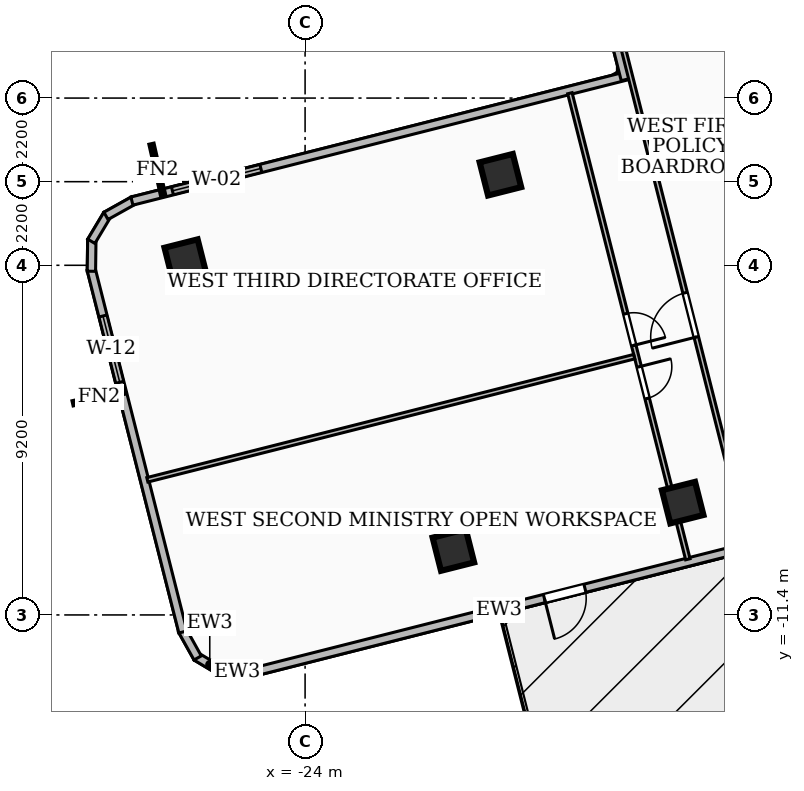
"""IFC4 building model, lengths in metres.
Left out: names, types, materials, properties, quantities, classifications, styles, units other than length and angle.
Written with IfcOpenShell. Run it as: python <this file> out.ifc"""

import sys

from ifc_helpers import new_model, si_unit, direction, frame, frame_2d, origin, origin_2d, place, context, subcontext, project, spatial, rectangle, extrude, element, fill, save


model = new_model("IFC4")
c1 = context("Model", 3, precision=1e-05, world=origin(), true_north=direction((0.0, 1.0)))
c2 = subcontext(c1, "Body", "Model", "MODEL_VIEW")
j1 = project(units=[si_unit("LENGTHUNIT", "METRE"), si_unit("PLANEANGLEUNIT", "RADIAN")], contexts=[c1])
p1 = place(None, origin())
s1 = spatial("IfcSite", under=j1, at=p1, CompositionType="ELEMENT")
p2 = place(p1, origin())
s2 = spatial("IfcBuilding", under=s1, at=p2, CompositionType="ELEMENT")
p3 = place(p2, frame((0.0, 0.0, 130.68)))
s3 = spatial("IfcBuildingStorey", under=s2, at=p3, CompositionType="ELEMENT", Elevation=130.68)
for number, where, z_axis, x_axis in (
    (1, (-18.86, 0.183, 0.0), (0.0, 0.0, 1.0), (0.969, 0.245, 0.0)),
    (2, (-14.064, -8.445, 0.0), (0.0, 0.0, 1.0), (0.969, 0.245, 0.0)),
    (3, (-27.153, -2.064, 0.0), (0.0, 0.0, 1.0), (0.969, 0.245, 0.0)),
    (4, (-20.098, -9.692, 0.0), (0.0, 0.0, 1.0), (0.969, 0.245, 0.0)),
):
    element("IfcColumn", number, at=place(p3, frame(where, z_axis=z_axis, x_axis=x_axis)), inside=s3, PredefinedType="COLUMN", context=c2, shape_type="SweptSolid", body=[
        extrude(rectangle(XDim=0.9, YDim=0.9, at=origin_2d()), origin(), (0.0, 0.0, 1.0), 3.6),
    ])
p4 = place(p3, frame((-12.371, -9.618, 0.0), z_axis=(0.0, 0.0, 1.0), x_axis=(-0.969434127448, -0.245351732293, 0.0)))
e5 = element("IfcWall", 5, at=p4, inside=s3, PredefinedType="SOLIDWALL", context=c2, shape_type="SweptSolid", body=[
    extrude(rectangle(XDim=13.458, YDim=0.22, at=frame_2d((6.729, 0.0))), origin(), (0.0, 0.0, 1.0), 3.32),
])
p5 = place(p4, frame((4.4, 0.0, 0.0)))
e6 = element("IfcOpeningElement", 6, at=p5, cuts=e5, PredefinedType="OPENING", context=c2, shape_type="SweptSolid", body=[
    extrude(rectangle(XDim=1.1, YDim=2.1, at=frame_2d((0.55, 1.05))), frame((0.0, 0.12, 0.0), z_axis=(0.0, -1.0, 0.0), x_axis=(1.0, 0.0, 0.0)), (0.0, 0.0, 1.0), 0.24),
])
p6 = place(p3, frame((-25.369, -12.914, 0.0), z_axis=(0.0, 0.0, 1.0), x_axis=(-0.999913243347, 0.013172159236, 0.0)))
e7 = element("IfcWall", 7, at=p6, inside=s3, PredefinedType="SOLIDWALL", context=c2, shape_type="SweptSolid", body=[
    extrude(rectangle(XDim=0.834, YDim=0.22, at=frame_2d((0.417, 0.0))), origin(), (0.0, 0.0, 1.0), 3.32),
])
p7 = place(p3, frame((-26.157, -12.916, 0.0), z_axis=(0.0, 0.0, 1.0), x_axis=(-0.858543269067, 0.512741119026, 0.0)))
e8 = element("IfcWall", 8, at=p7, inside=s3, PredefinedType="SOLIDWALL", context=c2, shape_type="SweptSolid", body=[
    extrude(rectangle(XDim=0.819, YDim=0.22, at=frame_2d((0.41, 0.0))), origin(), (0.0, 0.0, 1.0), 3.32),
])
p8 = place(p3, frame((-26.827, -12.531, 0.0), z_axis=(0.0, 0.0, 1.0), x_axis=(-0.486561807946, 0.873646156661, 0.0)))
e9 = element("IfcWall", 9, at=p8, inside=s3, PredefinedType="SOLIDWALL", context=c2, shape_type="SweptSolid", body=[
    extrude(rectangle(XDim=0.834, YDim=0.22, at=frame_2d((0.417, 0.0))), origin(), (0.0, 0.0, 1.0), 3.32),
])
p9 = place(p3, frame((-27.215, -11.848, 0.0), z_axis=(0.0, 0.0, 1.0), x_axis=(-0.245295842673, 0.969448270702, 0.0)))
e10 = element("IfcWall", 10, at=p9, inside=s3, PredefinedType="SOLIDWALL", context=c2, shape_type="SweptSolid", body=[
    extrude(rectangle(XDim=9.84, YDim=0.22, at=frame_2d((4.92, 0.0))), origin(), (0.0, 0.0, 1.0), 3.32),
])
p10 = place(p9, frame((6.776, 0.0, 0.85)))
e11 = element("IfcOpeningElement", 11, at=p10, cuts=e10, PredefinedType="OPENING", context=c2, shape_type="SweptSolid", body=[
    extrude(rectangle(XDim=1.8, YDim=1.6, at=frame_2d((0.9, 0.8))), frame((0.0, 0.12, 0.0), z_axis=(0.0, -1.0, 0.0), x_axis=(1.0, 0.0, 0.0)), (0.0, 0.0, 1.0), 0.24),
])
p11 = place(p3, frame((-29.623, -2.357, 0.0), z_axis=(0.0, 0.0, 1.0), x_axis=(0.013172159236, 0.999913243347, 0.0)))
e12 = element("IfcWall", 12, at=p11, inside=s3, PredefinedType="SOLIDWALL", context=c2, shape_type="SweptSolid", body=[
    extrude(rectangle(XDim=0.834, YDim=0.22, at=frame_2d((0.417, 0.0))), origin(), (0.0, 0.0, 1.0), 3.32),
])
p12 = place(p3, frame((-29.625, -1.569, 0.0), z_axis=(0.0, 0.0, 1.0), x_axis=(0.513266477087, 0.858229295409, 0.0)))
e13 = element("IfcWall", 13, at=p12, inside=s3, PredefinedType="SOLIDWALL", context=c2, shape_type="SweptSolid", body=[
    extrude(rectangle(XDim=0.818, YDim=0.22, at=frame_2d((0.409, 0.0))), origin(), (0.0, 0.0, 1.0), 3.32),
])
p13 = place(p3, frame((-29.24, -0.9, 0.0), z_axis=(0.0, 0.0, 1.0), x_axis=(0.873148499647, 0.487454303052, 0.0)))
e14 = element("IfcWall", 14, at=p13, inside=s3, PredefinedType="SOLIDWALL", context=c2, shape_type="SweptSolid", body=[
    extrude(rectangle(XDim=0.835, YDim=0.22, at=frame_2d((0.417, 0.0))), origin(), (0.0, 0.0, 1.0), 3.32),
])
p14 = place(p3, frame((-28.557, -0.511, 0.0), z_axis=(0.0, 0.0, 1.0), x_axis=(0.969429758912, 0.245368992613, 0.0)))
e15 = element("IfcWall", 15, at=p14, inside=s3, PredefinedType="SOLIDWALL", context=c2, shape_type="SweptSolid", body=[
    extrude(rectangle(XDim=13.457, YDim=0.22, at=frame_2d((6.729, 0.0))), origin(), (0.0, 0.0, 1.0), 3.32),
])
p15 = place(p14, frame((1.1, 0.0, 0.85)))
e16 = element("IfcOpeningElement", 16, at=p15, cuts=e15, PredefinedType="OPENING", context=c2, shape_type="SweptSolid", body=[
    extrude(rectangle(XDim=2.4, YDim=2.1, at=frame_2d((1.2, 1.05))), frame((0.0, 0.12, 0.0), z_axis=(0.0, -1.0, 0.0), x_axis=(1.0, 0.0, 0.0)), (0.0, 0.0, 1.0), 0.24),
])
p16 = place(p3, frame((-15.574, 2.684, 0.0), z_axis=(0.0, 0.0, 1.0), x_axis=(-0.245346347134, 0.969435490349, 0.0)))
e17 = element("IfcWall", 17, at=p16, inside=s3, PredefinedType="SOLIDWALL", context=c2, shape_type="SweptSolid", body=[
    extrude(rectangle(XDim=6.538, YDim=0.22, at=frame_2d((3.269, 0.0))), origin(), (0.0, 0.0, 1.0), 3.32),
])
p17 = place(p3, frame((-11.342, -13.433, 0.0), z_axis=(0.0, 0.0, 1.0), x_axis=(-0.24525085526, 0.969459652587, 0.0)))
e18 = element("IfcWall", 18, at=p17, inside=s3, PredefinedType="PARTITIONING", context=c2, shape_type="SweptSolid", body=[
    extrude(rectangle(XDim=20.261, YDim=0.12, at=frame_2d((10.13, 0.0))), origin(), (0.0, 0.0, 1.0), 2.55),
])
p18 = place(p17, frame((9.64, 0.0, 0.0)))
e19 = element("IfcOpeningElement", 19, at=p18, cuts=e18, PredefinedType="OPENING", context=c2, shape_type="SweptSolid", body=[
    extrude(rectangle(XDim=1.2, YDim=2.1, at=frame_2d((0.6, 1.05))), frame((0.0, 0.07, 0.0), z_axis=(0.0, -1.0, 0.0), x_axis=(1.0, 0.0, 0.0)), (0.0, 0.0, 1.0), 0.14),
])
p19 = place(p3, frame((-15.339, -4.604, 0.0), z_axis=(0.0, 0.0, 1.0), x_axis=(-0.969461701565, -0.245242755651, 0.0)))
e20 = element("IfcWall", 20, at=p19, inside=s3, PredefinedType="PARTITIONING", context=c2, shape_type="SweptSolid", body=[
    extrude(rectangle(XDim=13.215, YDim=0.12, at=frame_2d((6.608, 0.0))), origin(), (0.0, 0.0, 1.0), 2.7),
])
p20 = place(p3, frame((-17.032, 2.328, 0.0), z_axis=(0.0, 0.0, 1.0), x_axis=(0.245381918011, -0.969426487318, 0.0)))
e21 = element("IfcWall", 21, at=p20, inside=s3, PredefinedType="PARTITIONING", context=c2, shape_type="SweptSolid", body=[
    extrude(rectangle(XDim=12.65, YDim=0.12, at=frame_2d((6.325, 0.0))), origin(), (0.0, 0.0, 1.0), 2.55),
])
p21 = place(p20, frame((5.985, 0.0, 0.0)))
e22 = element("IfcOpeningElement", 22, at=p21, cuts=e21, PredefinedType="OPENING", context=c2, shape_type="SweptSolid", body=[
    extrude(rectangle(XDim=0.86, YDim=2.04, at=frame_2d((0.43, 1.02))), frame((0.0, 0.07, 0.0), z_axis=(0.0, -1.0, 0.0), x_axis=(1.0, 0.0, 0.0)), (0.0, 0.0, 1.0), 0.14),
])
p22 = place(p20, frame((7.425, 0.0, 0.0)))
e23 = element("IfcOpeningElement", 23, at=p22, cuts=e21, PredefinedType="OPENING", context=c2, shape_type="SweptSolid", body=[
    extrude(rectangle(XDim=0.86, YDim=2.04, at=frame_2d((0.43, 1.02))), frame((0.0, 0.07, 0.0), z_axis=(0.0, -1.0, 0.0), x_axis=(1.0, 0.0, 0.0)), (0.0, 0.0, 1.0), 0.14),
])
p23 = place(p5, origin())
e24 = element("IfcDoor", 24, at=p23, inside=s3, OperationType="SINGLE_SWING_RIGHT", PredefinedType="DOOR", context=c2, shape_type="SweptSolid", body=[
    extrude(rectangle(XDim=1.1, YDim=2.1, at=frame_2d((0.55, 1.05))), frame((0.0, 0.025, 0.0), z_axis=(0.0, -1.0, 0.0), x_axis=(1.0, 0.0, 0.0)), (0.0, 0.0, 1.0), 0.05),
])
fill(e6, e24)
p24 = place(p10, origin())
e25 = element("IfcWindow", 25, at=p24, inside=s3, PartitioningType="SINGLE_PANEL", PredefinedType="WINDOW", context=c2, shape_type="SweptSolid", body=[
    extrude(rectangle(XDim=1.8, YDim=1.6, at=frame_2d((0.9, 0.8))), frame((0.0, 0.03, 0.0), z_axis=(0.0, -1.0, 0.0), x_axis=(1.0, 0.0, 0.0)), (0.0, 0.0, 1.0), 0.06),
])
fill(e11, e25)
p25 = place(p15, origin())
e26 = element("IfcWindow", 26, at=p25, inside=s3, PartitioningType="SINGLE_PANEL", PredefinedType="WINDOW", context=c2, shape_type="SweptSolid", body=[
    extrude(rectangle(XDim=2.4, YDim=2.1, at=frame_2d((1.2, 1.05))), frame((0.0, 0.03, 0.0), z_axis=(0.0, -1.0, 0.0), x_axis=(1.0, 0.0, 0.0)), (0.0, 0.0, 1.0), 0.06),
])
fill(e16, e26)
p26 = place(p18, origin())
e27 = element("IfcDoor", 27, at=p26, inside=s3, OperationType="SINGLE_SWING_LEFT", PredefinedType="DOOR", context=c2, shape_type="SweptSolid", body=[
    extrude(rectangle(XDim=1.2, YDim=2.1, at=frame_2d((0.6, 1.05))), frame((0.0, 0.025, 0.0), z_axis=(0.0, -1.0, 0.0), x_axis=(1.0, 0.0, 0.0)), (0.0, 0.0, 1.0), 0.05),
])
fill(e19, e27)
p27 = place(p21, origin())
e28 = element("IfcDoor", 28, at=p27, inside=s3, OperationType="SINGLE_SWING_RIGHT", PredefinedType="DOOR", context=c2, shape_type="SweptSolid", body=[
    extrude(rectangle(XDim=0.86, YDim=2.04, at=frame_2d((0.43, 1.02))), frame((0.0, 0.025, 0.0), z_axis=(0.0, -1.0, 0.0), x_axis=(1.0, 0.0, 0.0)), (0.0, 0.0, 1.0), 0.05),
])
fill(e22, e28)
p28 = place(p22, origin())
e29 = element("IfcDoor", 29, at=p28, inside=s3, OperationType="SINGLE_SWING_LEFT", PredefinedType="DOOR", context=c2, shape_type="SweptSolid", body=[
    extrude(rectangle(XDim=0.86, YDim=2.04, at=frame_2d((0.43, 1.02))), frame((0.0, 0.025, 0.0), z_axis=(0.0, -1.0, 0.0), x_axis=(1.0, 0.0, 0.0)), (0.0, 0.0, 1.0), 0.05),
])
fill(e23, e29)
save(model, sys.argv[1])
